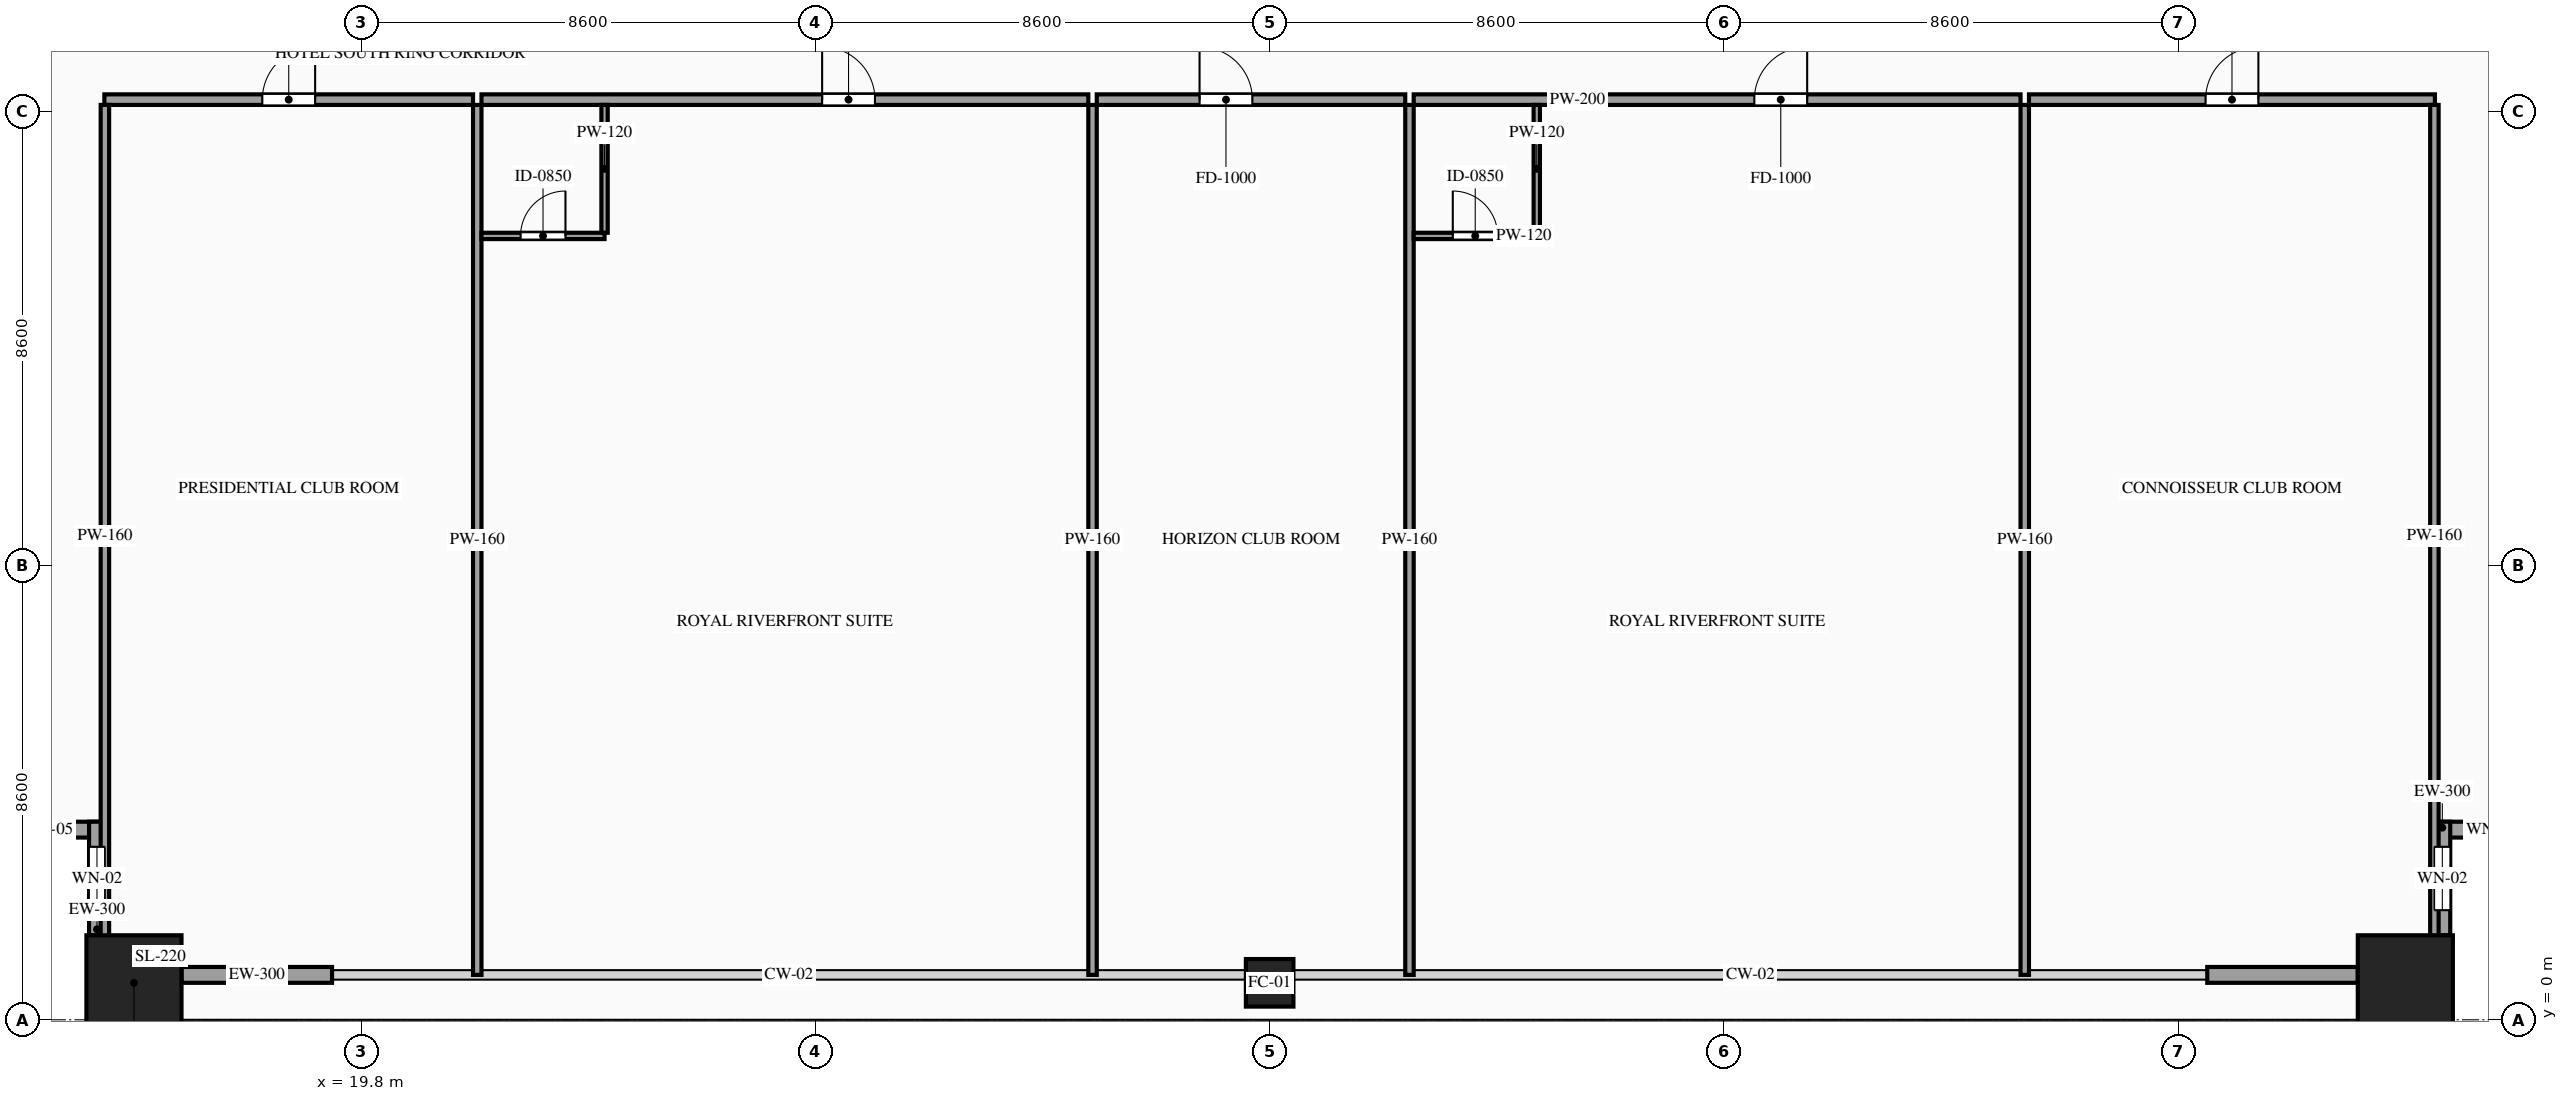
"""IFC4 building model, lengths in metres.
Left out: names, types, materials, properties, quantities, classifications, styles, units other than length and angle.
Written with IfcOpenShell. Run it as: python <this file> out.ifc"""

import sys

from ifc_helpers import new_model, si_unit, direction, frame, frame_2d, origin, origin_2d, place, context, subcontext, project, spatial, rectangle, hollow_rectangle, extrude, source, transform, mapped, element, fill, save


model = new_model("IFC4")
c1 = context("Model", 3, precision=1e-05, world=origin(), true_north=direction((0.0, 1.0)))
c2 = subcontext(c1, "Body", "Model", "MODEL_VIEW")
j1 = project(units=[si_unit("LENGTHUNIT", "METRE"), si_unit("PLANEANGLEUNIT", "RADIAN")], contexts=[c1])
p1 = place(None, origin())
s1 = spatial("IfcSite", under=j1, at=p1, CompositionType="ELEMENT")
p2 = place(p1, origin())
s2 = spatial("IfcBuilding", under=s1, at=p2, CompositionType="ELEMENT")
p3 = place(p2, frame((0.0, 0.0, 82.0)))
s3 = spatial("IfcBuildingStorey", under=s2, at=p3, CompositionType="ELEMENT", Elevation=82.0)
m1 = source(origin(), c2, "Body", "SweptSolid", [
    extrude(hollow_rectangle(XDim=1.8, YDim=1.8, WallThickness=0.08, at=origin_2d()), origin(), (0.0, 0.0, 1.0), 3.32),
])
p4 = place(p3, frame((15.5, 0.7, 0.0), z_axis=(0.0, 0.0, 1.0), x_axis=(1.0, 0.0, 0.0)))
e1 = element("IfcColumn", 1, at=p4, inside=s3, PredefinedType="COLUMN", context=c2, shape_type="MappedRepresentation", body=[
    mapped(m1, transform((0.0, 0.0, 0.0), scale=1.0)),
])
m2 = source(origin(), c2, "Body", "SweptSolid", [
    extrude(hollow_rectangle(XDim=0.9, YDim=0.9, WallThickness=0.042, at=origin_2d()), origin(), (0.0, 0.0, 1.0), 3.32),
])
p5 = place(p3, frame((37.0, 0.7, 0.0), z_axis=(0.0, 0.0, 1.0), x_axis=(1.0, 0.0, 0.0)))
e2 = element("IfcColumn", 2, at=p5, inside=s3, PredefinedType="COLUMN", context=c2, shape_type="MappedRepresentation", body=[
    mapped(m2, transform((0.0, 0.0, 0.0), scale=1.0)),
])
p6 = place(p3, frame((58.5, 0.7, 0.0), z_axis=(0.0, 0.0, 1.0), x_axis=(1.0, 0.0, 0.0)))
e3 = element("IfcColumn", 3, at=p6, inside=s3, PredefinedType="COLUMN", context=c2, shape_type="MappedRepresentation", body=[
    mapped(m1, transform((0.0, 0.0, 0.0), scale=1.0)),
])
p7 = place(p3, frame((12.8, 3.6, 0.0), z_axis=(0.0, 0.0, 1.0), x_axis=(1.0, 0.0, 0.0)))
e4 = element("IfcWall", 4, at=p7, inside=s3, PredefinedType="SOLIDWALL", context=c2, shape_type="SweptSolid", body=[
    extrude(rectangle(XDim=2.15, YDim=0.3, at=frame_2d((1.075, 0.0))), origin(), (0.0, 0.0, 1.0), 3.32),
])
p8 = place(p7, frame((0.625, 0.0, 0.85)))
e5 = element("IfcOpeningElement", 5, at=p8, cuts=e4, PredefinedType="OPENING", context=c2, shape_type="SweptSolid", body=[
    extrude(rectangle(XDim=0.9, YDim=1.5, at=frame_2d((0.45, 0.75))), frame((0.0, 0.165, 0.0), z_axis=(0.0, -1.0, 0.0), x_axis=(1.0, 0.0, 0.0)), (0.0, 0.0, 1.0), 0.33),
])
p9 = place(p3, frame((14.8, 3.75, 0.0), z_axis=(0.0, 0.0, 1.0), x_axis=(0.0, -1.0, 0.0)))
e6 = element("IfcWall", 6, at=p9, inside=s3, PredefinedType="SOLIDWALL", context=c2, shape_type="SweptSolid", body=[
    extrude(rectangle(XDim=2.15, YDim=0.3, at=frame_2d((1.075, 0.0))), origin(), (0.0, 0.0, 1.0), 3.32),
])
p10 = place(p9, frame((0.475, 0.0, 0.85)))
e7 = element("IfcOpeningElement", 7, at=p10, cuts=e6, PredefinedType="OPENING", context=c2, shape_type="SweptSolid", body=[
    extrude(rectangle(XDim=1.2, YDim=2.1, at=frame_2d((0.6, 1.05))), frame((0.0, 0.165, 0.0), z_axis=(0.0, -1.0, 0.0), x_axis=(1.0, 0.0, 0.0)), (0.0, 0.0, 1.0), 0.33),
])
p11 = place(p3, frame((59.05, 3.6, 0.0), z_axis=(0.0, 0.0, 1.0), x_axis=(1.0, 0.0, 0.0)))
e8 = element("IfcWall", 8, at=p11, inside=s3, PredefinedType="SOLIDWALL", context=c2, shape_type="SweptSolid", body=[
    extrude(rectangle(XDim=2.15, YDim=0.3, at=frame_2d((1.075, 0.0))), origin(), (0.0, 0.0, 1.0), 3.32),
])
p12 = place(p11, frame((0.625, 0.0, 0.85)))
e9 = element("IfcOpeningElement", 9, at=p12, cuts=e8, PredefinedType="OPENING", context=c2, shape_type="SweptSolid", body=[
    extrude(rectangle(XDim=0.9, YDim=1.5, at=frame_2d((0.45, 0.75))), frame((0.0, 0.165, 0.0), z_axis=(0.0, -1.0, 0.0), x_axis=(1.0, 0.0, 0.0)), (0.0, 0.0, 1.0), 0.33),
])
p13 = place(p3, frame((59.2, 1.6, 0.0), z_axis=(0.0, 0.0, 1.0), x_axis=(0.0, 1.0, 0.0)))
e10 = element("IfcWall", 10, at=p13, inside=s3, PredefinedType="SOLIDWALL", context=c2, shape_type="SweptSolid", body=[
    extrude(rectangle(XDim=2.15, YDim=0.3, at=frame_2d((1.075, 0.0))), origin(), (0.0, 0.0, 1.0), 3.32),
])
p14 = place(p13, frame((0.475, 0.0, 0.85)))
e11 = element("IfcOpeningElement", 11, at=p14, cuts=e10, PredefinedType="OPENING", context=c2, shape_type="SweptSolid", body=[
    extrude(rectangle(XDim=1.2, YDim=2.1, at=frame_2d((0.6, 1.05))), frame((0.0, 0.165, 0.0), z_axis=(0.0, -1.0, 0.0), x_axis=(1.0, 0.0, 0.0)), (0.0, 0.0, 1.0), 0.33),
])
m3 = source(origin(), c2, "Body", "SweptSolid", [
    extrude(rectangle(XDim=2.85, YDim=0.3, at=frame_2d((1.425, 0.0))), origin(), (0.0, 0.0, 1.0), 2.715),
])
for number, where, z_axis, x_axis in (
    (12, (16.4, 0.85, 0.0), (0.0, 0.0, 1.0), (1.0, 0.0, 0.0)),
    (13, (54.75, 0.85, 0.0), (0.0, 0.0, 1.0), (1.0, 0.0, 0.0)),
):
    element("IfcWall", number, at=place(p3, frame(where, z_axis=z_axis, x_axis=x_axis)), inside=s3, PredefinedType="SOLIDWALL", context=c2, shape_type="MappedRepresentation", body=[
        mapped(m3, transform((0.0, 0.0, 0.0), scale=1.0)),
    ])
p15 = place(p3, frame((14.94, 17.42, 0.0), z_axis=(0.0, 0.0, 1.0), x_axis=(1.0, 0.0, 0.0)))
e14 = element("IfcWall", 14, at=p15, inside=s3, PredefinedType="PARTITIONING", context=c2, shape_type="SweptSolid", body=[
    extrude(rectangle(XDim=6.979, YDim=0.2, at=frame_2d((3.49, 0.0))), origin(), (0.0, 0.0, 1.0), 3.32),
])
p16 = place(p15, frame((2.99, 0.0, 0.0)))
e15 = element("IfcOpeningElement", 15, at=p16, cuts=e14, PredefinedType="OPENING", context=c2, shape_type="SweptSolid", body=[
    extrude(rectangle(XDim=1.0, YDim=2.2, at=frame_2d((0.5, 1.1))), frame((0.0, 0.115, 0.0), z_axis=(0.0, -1.0, 0.0), x_axis=(1.0, 0.0, 0.0)), (0.0, 0.0, 1.0), 0.23),
])
m4 = source(origin(), c2, "Body", "SweptSolid", [
    extrude(rectangle(XDim=16.47, YDim=0.16, at=frame_2d((8.235, 0.0))), origin(), (0.0, 0.0, 1.0), 3.32),
])
p17 = place(p3, frame((21.999, 0.85, 0.0), z_axis=(0.0, 0.0, 1.0), x_axis=(0.0, 1.0, 0.0)))
e16 = element("IfcWall", 16, at=p17, inside=s3, PredefinedType="PARTITIONING", context=c2, shape_type="MappedRepresentation", body=[
    mapped(m4, transform((0.0, 0.0, 0.0), scale=1.0)),
])
p18 = place(p3, frame((22.079, 17.42, 0.0), z_axis=(0.0, 0.0, 1.0), x_axis=(1.0, 0.0, 0.0)))
e17 = element("IfcWall", 17, at=p18, inside=s3, PredefinedType="PARTITIONING", context=c2, shape_type="SweptSolid", body=[
    extrude(rectangle(XDim=11.488, YDim=0.2, at=frame_2d((5.744, 0.0))), origin(), (0.0, 0.0, 1.0), 3.32),
])
p19 = place(p18, frame((6.449, 0.0, 0.0)))
e18 = element("IfcOpeningElement", 18, at=p19, cuts=e17, PredefinedType="OPENING", context=c2, shape_type="SweptSolid", body=[
    extrude(rectangle(XDim=1.0, YDim=2.2, at=frame_2d((0.5, 1.1))), frame((0.0, 0.115, 0.0), z_axis=(0.0, -1.0, 0.0), x_axis=(1.0, 0.0, 0.0)), (0.0, 0.0, 1.0), 0.23),
])
p20 = place(p3, frame((33.647, 0.85, 0.0), z_axis=(0.0, 0.0, 1.0), x_axis=(0.0, 1.0, 0.0)))
e19 = element("IfcWall", 19, at=p20, inside=s3, PredefinedType="PARTITIONING", context=c2, shape_type="MappedRepresentation", body=[
    mapped(m4, transform((0.0, 0.0, 0.0), scale=1.0)),
])
p21 = place(p3, frame((22.079, 14.84, 0.0), z_axis=(0.0, 0.0, 1.0), x_axis=(1.0, 0.0, 0.0)))
e20 = element("IfcWall", 20, at=p21, inside=s3, PredefinedType="PARTITIONING", context=c2, shape_type="SweptSolid", body=[
    extrude(rectangle(XDim=2.33, YDim=0.12, at=frame_2d((1.165, 0.0))), origin(), (0.0, 0.0, 1.0), 3.32),
])
p22 = place(p21, frame((0.74, 0.0, 0.0)))
e21 = element("IfcOpeningElement", 21, at=p22, cuts=e20, PredefinedType="OPENING", context=c2, shape_type="SweptSolid", body=[
    extrude(rectangle(XDim=0.85, YDim=2.1, at=frame_2d((0.425, 1.05))), frame((0.0, 0.075, 0.0), z_axis=(0.0, -1.0, 0.0), x_axis=(1.0, 0.0, 0.0)), (0.0, 0.0, 1.0), 0.15),
])
m5 = source(origin(), c2, "Body", "SweptSolid", [
    extrude(rectangle(XDim=2.42, YDim=0.12, at=frame_2d((1.21, 0.0))), origin(), (0.0, 0.0, 1.0), 3.32),
])
p23 = place(p3, frame((24.409, 14.9, 0.0), z_axis=(0.0, 0.0, 1.0), x_axis=(0.0, 1.0, 0.0)))
e22 = element("IfcWall", 22, at=p23, inside=s3, PredefinedType="PARTITIONING", context=c2, shape_type="MappedRepresentation", body=[
    mapped(m5, transform((0.0, 0.0, 0.0), scale=1.0)),
])
p24 = place(p3, frame((33.727, 17.42, 0.0), z_axis=(0.0, 0.0, 1.0), x_axis=(1.0, 0.0, 0.0)))
e23 = element("IfcWall", 23, at=p24, inside=s3, PredefinedType="PARTITIONING", context=c2, shape_type="SweptSolid", body=[
    extrude(rectangle(XDim=5.84, YDim=0.2, at=frame_2d((2.92, 0.0))), origin(), (0.0, 0.0, 1.0), 3.32),
])
p25 = place(p24, frame((1.946, 0.0, 0.0)))
e24 = element("IfcOpeningElement", 24, at=p25, cuts=e23, PredefinedType="OPENING", context=c2, shape_type="SweptSolid", body=[
    extrude(rectangle(XDim=1.0, YDim=2.2, at=frame_2d((0.5, 1.1))), frame((0.0, 0.115, 0.0), z_axis=(0.0, -1.0, 0.0), x_axis=(1.0, 0.0, 0.0)), (0.0, 0.0, 1.0), 0.23),
])
p26 = place(p3, frame((39.647, 0.85, 0.0), z_axis=(0.0, 0.0, 1.0), x_axis=(0.0, 1.0, 0.0)))
e25 = element("IfcWall", 25, at=p26, inside=s3, PredefinedType="PARTITIONING", context=c2, shape_type="MappedRepresentation", body=[
    mapped(m4, transform((0.0, 0.0, 0.0), scale=1.0)),
])
p27 = place(p3, frame((39.727, 17.42, 0.0), z_axis=(0.0, 0.0, 1.0), x_axis=(1.0, 0.0, 0.0)))
e26 = element("IfcWall", 26, at=p27, inside=s3, PredefinedType="PARTITIONING", context=c2, shape_type="SweptSolid", body=[
    extrude(rectangle(XDim=11.488, YDim=0.2, at=frame_2d((5.744, 0.0))), origin(), (0.0, 0.0, 1.0), 3.32),
])
p28 = place(p27, frame((6.449, 0.0, 0.0)))
e27 = element("IfcOpeningElement", 27, at=p28, cuts=e26, PredefinedType="OPENING", context=c2, shape_type="SweptSolid", body=[
    extrude(rectangle(XDim=1.0, YDim=2.2, at=frame_2d((0.5, 1.1))), frame((0.0, 0.115, 0.0), z_axis=(0.0, -1.0, 0.0), x_axis=(1.0, 0.0, 0.0)), (0.0, 0.0, 1.0), 0.23),
])
p29 = place(p3, frame((51.295, 0.85, 0.0), z_axis=(0.0, 0.0, 1.0), x_axis=(0.0, 1.0, 0.0)))
e28 = element("IfcWall", 28, at=p29, inside=s3, PredefinedType="PARTITIONING", context=c2, shape_type="MappedRepresentation", body=[
    mapped(m4, transform((0.0, 0.0, 0.0), scale=1.0)),
])
p30 = place(p3, frame((39.727, 14.84, 0.0), z_axis=(0.0, 0.0, 1.0), x_axis=(1.0, 0.0, 0.0)))
e29 = element("IfcWall", 29, at=p30, inside=s3, PredefinedType="PARTITIONING", context=c2, shape_type="SweptSolid", body=[
    extrude(rectangle(XDim=2.33, YDim=0.12, at=frame_2d((1.165, 0.0))), origin(), (0.0, 0.0, 1.0), 3.32),
])
p31 = place(p30, frame((0.74, 0.0, 0.0)))
e30 = element("IfcOpeningElement", 30, at=p31, cuts=e29, PredefinedType="OPENING", context=c2, shape_type="SweptSolid", body=[
    extrude(rectangle(XDim=0.85, YDim=2.1, at=frame_2d((0.425, 1.05))), frame((0.0, 0.075, 0.0), z_axis=(0.0, -1.0, 0.0), x_axis=(1.0, 0.0, 0.0)), (0.0, 0.0, 1.0), 0.15),
])
p32 = place(p3, frame((42.057, 14.9, 0.0), z_axis=(0.0, 0.0, 1.0), x_axis=(0.0, 1.0, 0.0)))
e31 = element("IfcWall", 31, at=p32, inside=s3, PredefinedType="PARTITIONING", context=c2, shape_type="MappedRepresentation", body=[
    mapped(m5, transform((0.0, 0.0, 0.0), scale=1.0)),
])
p33 = place(p3, frame((51.375, 17.42, 0.0), z_axis=(0.0, 0.0, 1.0), x_axis=(1.0, 0.0, 0.0)))
e32 = element("IfcWall", 32, at=p33, inside=s3, PredefinedType="PARTITIONING", context=c2, shape_type="SweptSolid", body=[
    extrude(rectangle(XDim=7.685, YDim=0.2, at=frame_2d((3.843, 0.0))), origin(), (0.0, 0.0, 1.0), 3.32),
])
p34 = place(p33, frame((3.343, 0.0, 0.0)))
e33 = element("IfcOpeningElement", 33, at=p34, cuts=e32, PredefinedType="OPENING", context=c2, shape_type="SweptSolid", body=[
    extrude(rectangle(XDim=1.0, YDim=2.2, at=frame_2d((0.5, 1.1))), frame((0.0, 0.115, 0.0), z_axis=(0.0, -1.0, 0.0), x_axis=(1.0, 0.0, 0.0)), (0.0, 0.0, 1.0), 0.23),
])
m6 = source(origin(), c2, "Body", "SweptSolid", [
    extrude(rectangle(XDim=16.32, YDim=0.16, at=frame_2d((8.16, 0.0))), origin(), (0.0, 0.0, 1.0), 3.32),
])
for number, where, z_axis, x_axis in (
    (34, (14.95, 1.0, 0.0), (0.0, 0.0, 1.0), (0.0, 1.0, 0.0)),
    (35, (59.05, 1.0, 0.0), (0.0, 0.0, 1.0), (0.0, 1.0, 0.0)),
):
    element("IfcWall", number, at=place(p3, frame(where, z_axis=z_axis, x_axis=x_axis)), inside=s3, PredefinedType="PARTITIONING", context=c2, shape_type="MappedRepresentation", body=[
        mapped(m6, transform((0.0, 0.0, 0.0), scale=1.0)),
    ])
m7 = source(origin(), c2, "Body", "SweptSolid", [
    extrude(rectangle(XDim=0.9, YDim=1.5, at=frame_2d((0.45, 0.75))), frame((0.0, 0.03, 0.0), z_axis=(0.0, -1.0, 0.0), x_axis=(1.0, 0.0, 0.0)), (0.0, 0.0, 1.0), 0.06),
])
p35 = place(p8, origin())
e36 = element("IfcWindow", 36, at=p35, inside=s3, PartitioningType="SINGLE_PANEL", PredefinedType="WINDOW", context=c2, shape_type="MappedRepresentation", body=[
    mapped(m7, transform((0.0, 0.0, 0.0), scale=1.0)),
])
fill(e5, e36)
m8 = source(origin(), c2, "Body", "SweptSolid", [
    extrude(rectangle(XDim=1.2, YDim=2.1, at=frame_2d((0.6, 1.05))), frame((0.0, 0.03, 0.0), z_axis=(0.0, -1.0, 0.0), x_axis=(1.0, 0.0, 0.0)), (0.0, 0.0, 1.0), 0.06),
])
p36 = place(p10, origin())
e37 = element("IfcWindow", 37, at=p36, inside=s3, PartitioningType="SINGLE_PANEL", PredefinedType="WINDOW", context=c2, shape_type="MappedRepresentation", body=[
    mapped(m8, transform((0.0, 0.0, 0.0), scale=1.0)),
])
fill(e7, e37)
p37 = place(p12, origin())
e38 = element("IfcWindow", 38, at=p37, inside=s3, PartitioningType="SINGLE_PANEL", PredefinedType="WINDOW", context=c2, shape_type="MappedRepresentation", body=[
    mapped(m7, transform((0.0, 0.0, 0.0), scale=1.0)),
])
fill(e9, e38)
p38 = place(p14, origin())
e39 = element("IfcWindow", 39, at=p38, inside=s3, PartitioningType="SINGLE_PANEL", PredefinedType="WINDOW", context=c2, shape_type="MappedRepresentation", body=[
    mapped(m8, transform((0.0, 0.0, 0.0), scale=1.0)),
])
fill(e11, e39)
m9 = source(origin(), c2, "Body", "SweptSolid", [
    extrude(rectangle(XDim=1.0, YDim=2.2, at=frame_2d((0.5, 1.1))), frame((0.0, 0.025, 0.0), z_axis=(0.0, -1.0, 0.0), x_axis=(1.0, 0.0, 0.0)), (0.0, 0.0, 1.0), 0.05),
])
p39 = place(p16, origin())
e40 = element("IfcDoor", 40, at=p39, inside=s3, OperationType="SINGLE_SWING_RIGHT", PredefinedType="DOOR", context=c2, shape_type="MappedRepresentation", body=[
    mapped(m9, transform((0.0, 0.0, 0.0), scale=1.0)),
])
fill(e15, e40)
p40 = place(p19, origin())
e41 = element("IfcDoor", 41, at=p40, inside=s3, OperationType="SINGLE_SWING_LEFT", PredefinedType="DOOR", context=c2, shape_type="MappedRepresentation", body=[
    mapped(m9, transform((0.0, 0.0, 0.0), scale=1.0)),
])
fill(e18, e41)
m10 = source(origin(), c2, "Body", "SweptSolid", [
    extrude(rectangle(XDim=0.85, YDim=2.1, at=frame_2d((0.425, 1.05))), frame((0.0, 0.025, 0.0), z_axis=(0.0, -1.0, 0.0), x_axis=(1.0, 0.0, 0.0)), (0.0, 0.0, 1.0), 0.05),
])
p41 = place(p22, origin())
e42 = element("IfcDoor", 42, at=p41, inside=s3, OperationType="SINGLE_SWING_RIGHT", PredefinedType="DOOR", context=c2, shape_type="MappedRepresentation", body=[
    mapped(m10, transform((0.0, 0.0, 0.0), scale=1.0)),
])
fill(e21, e42)
p42 = place(p25, origin())
e43 = element("IfcDoor", 43, at=p42, inside=s3, OperationType="SINGLE_SWING_LEFT", PredefinedType="DOOR", context=c2, shape_type="MappedRepresentation", body=[
    mapped(m9, transform((0.0, 0.0, 0.0), scale=1.0)),
])
fill(e24, e43)
p43 = place(p28, origin())
e44 = element("IfcDoor", 44, at=p43, inside=s3, OperationType="SINGLE_SWING_RIGHT", PredefinedType="DOOR", context=c2, shape_type="MappedRepresentation", body=[
    mapped(m9, transform((0.0, 0.0, 0.0), scale=1.0)),
])
fill(e27, e44)
p44 = place(p31, origin())
e45 = element("IfcDoor", 45, at=p44, inside=s3, OperationType="SINGLE_SWING_LEFT", PredefinedType="DOOR", context=c2, shape_type="MappedRepresentation", body=[
    mapped(m10, transform((0.0, 0.0, 0.0), scale=1.0)),
])
fill(e30, e45)
p45 = place(p34, origin())
e46 = element("IfcDoor", 46, at=p45, inside=s3, OperationType="SINGLE_SWING_RIGHT", PredefinedType="DOOR", context=c2, shape_type="MappedRepresentation", body=[
    mapped(m9, transform((0.0, 0.0, 0.0), scale=1.0)),
])
fill(e33, e46)
save(model, sys.argv[1])
